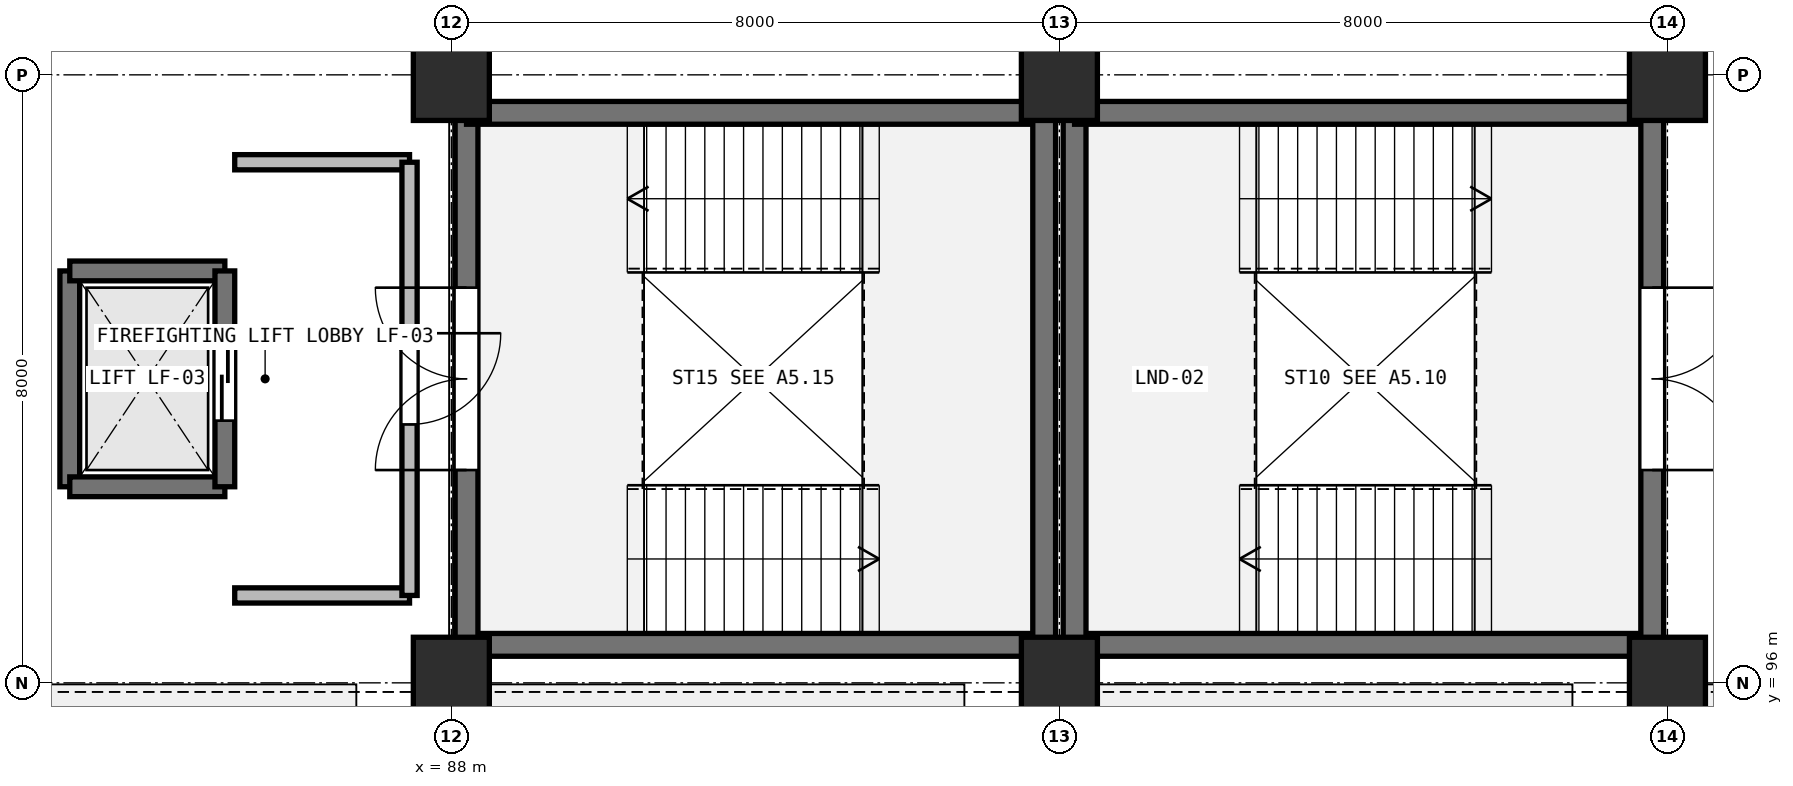
"""IFC4 building model, lengths in metres.
Left out: names, types, materials, properties, quantities, classifications, styles, units other than length and angle.
Written with IfcOpenShell. Run it as: python <this file> out.ifc"""

import sys

from ifc_helpers import new_model, si_unit, direction, frame, frame_2d, origin, origin_2d, place, context, subcontext, project, spatial, rectangle, extrude, element, fill, save


model = new_model("IFC4")
c1 = context("Model", 3, precision=1e-05, world=origin(), true_north=direction((0.0, 1.0)))
c2 = subcontext(c1, "Body", "Model", "MODEL_VIEW")
j1 = project(units=[si_unit("LENGTHUNIT", "METRE"), si_unit("PLANEANGLEUNIT", "RADIAN")], contexts=[c1])
p1 = place(None, origin())
s1 = spatial("IfcSite", under=j1, at=p1, CompositionType="ELEMENT")
p2 = place(p1, origin())
s2 = spatial("IfcBuilding", under=s1, at=p2, CompositionType="ELEMENT")
p3 = place(p2, frame((0.0, 0.0, 15.0)))
s3 = spatial("IfcBuildingStorey", under=s2, at=p3, CompositionType="ELEMENT", Elevation=15.0)
for number, where, z_axis, x_axis in (
    (1, (88.0, 96.0, 0.0), (0.0, 0.0, 1.0), (1.0, 0.0, 0.0)),
    (2, (88.0, 104.0, 0.0), (0.0, 0.0, 1.0), (1.0, 0.0, 0.0)),
    (3, (96.0, 96.0, 0.0), (0.0, 0.0, 1.0), (1.0, 0.0, 0.0)),
    (4, (96.0, 104.0, 0.0), (0.0, 0.0, 1.0), (1.0, 0.0, 0.0)),
    (5, (104.0, 96.0, 0.0), (0.0, 0.0, 1.0), (1.0, 0.0, 0.0)),
    (6, (104.0, 104.0, 0.0), (0.0, 0.0, 1.0), (1.0, 0.0, 0.0)),
):
    element("IfcColumn", number, at=place(p3, frame(where, z_axis=z_axis, x_axis=x_axis)), inside=s3, PredefinedType="COLUMN", context=c2, shape_type="SweptSolid", body=[
        extrude(rectangle(XDim=1.0, YDim=1.2, at=origin_2d()), origin(), (0.0, 0.0, 1.0), 4.8),
    ])
p4 = place(p3, frame((103.8, 96.5, 0.0), z_axis=(0.0, 0.0, 1.0), x_axis=(-1.0, 0.0, 0.0)))
e7 = element("IfcWall", 7, at=p4, inside=s3, PredefinedType="SHEAR", context=c2, shape_type="SweptSolid", body=[
    extrude(rectangle(XDim=7.6, YDim=0.3, at=frame_2d((3.8, 0.0))), origin(), (0.0, 0.0, 1.0), 4.5),
])
p5 = place(p3, frame((96.2, 96.5, 0.0), z_axis=(0.0, 0.0, 1.0), x_axis=(0.0, 1.0, 0.0)))
e8 = element("IfcWall", 8, at=p5, inside=s3, PredefinedType="SHEAR", context=c2, shape_type="SweptSolid", body=[
    extrude(rectangle(XDim=7.0, YDim=0.3, at=frame_2d((3.5, 0.0))), origin(), (0.0, 0.0, 1.0), 4.5),
])
p6 = place(p3, frame((96.2, 103.5, 0.0), z_axis=(0.0, 0.0, 1.0), x_axis=(1.0, 0.0, 0.0)))
e9 = element("IfcWall", 9, at=p6, inside=s3, PredefinedType="SHEAR", context=c2, shape_type="SweptSolid", body=[
    extrude(rectangle(XDim=7.6, YDim=0.3, at=frame_2d((3.8, 0.0))), origin(), (0.0, 0.0, 1.0), 4.5),
])
p7 = place(p3, frame((103.8, 103.5, 0.0), z_axis=(0.0, 0.0, 1.0), x_axis=(0.0, -1.0, 0.0)))
e10 = element("IfcWall", 10, at=p7, inside=s3, PredefinedType="SHEAR", context=c2, shape_type="SweptSolid", body=[
    extrude(rectangle(XDim=7.0, YDim=0.3, at=frame_2d((3.5, 0.0))), origin(), (0.0, 0.0, 1.0), 4.5),
])
p8 = place(p7, frame((2.3, 0.0, 0.0)))
e11 = element("IfcOpeningElement", 11, at=p8, cuts=e10, PredefinedType="OPENING", context=c2, shape_type="SweptSolid", body=[
    extrude(rectangle(XDim=2.4, YDim=2.2, at=frame_2d((1.2, 1.1))), frame((0.0, 0.16, 0.0), z_axis=(0.0, -1.0, 0.0), x_axis=(1.0, 0.0, 0.0)), (0.0, 0.0, 1.0), 0.32),
])
p9 = place(p3, frame((95.8, 96.5, 0.0), z_axis=(0.0, 0.0, 1.0), x_axis=(-1.0, 0.0, 0.0)))
e12 = element("IfcWall", 12, at=p9, inside=s3, PredefinedType="SHEAR", context=c2, shape_type="SweptSolid", body=[
    extrude(rectangle(XDim=7.6, YDim=0.3, at=frame_2d((3.8, 0.0))), origin(), (0.0, 0.0, 1.0), 4.5),
])
p10 = place(p3, frame((88.2, 96.5, 0.0), z_axis=(0.0, 0.0, 1.0), x_axis=(0.0, 1.0, 0.0)))
e13 = element("IfcWall", 13, at=p10, inside=s3, PredefinedType="SHEAR", context=c2, shape_type="SweptSolid", body=[
    extrude(rectangle(XDim=7.0, YDim=0.3, at=frame_2d((3.5, 0.0))), origin(), (0.0, 0.0, 1.0), 4.5),
])
p11 = place(p10, frame((2.3, 0.0, 0.0)))
e14 = element("IfcOpeningElement", 14, at=p11, cuts=e13, PredefinedType="OPENING", context=c2, shape_type="SweptSolid", body=[
    extrude(rectangle(XDim=2.4, YDim=2.2, at=frame_2d((1.2, 1.1))), frame((0.0, 0.16, 0.0), z_axis=(0.0, -1.0, 0.0), x_axis=(1.0, 0.0, 0.0)), (0.0, 0.0, 1.0), 0.32),
])
p12 = place(p3, frame((88.2, 103.5, 0.0), z_axis=(0.0, 0.0, 1.0), x_axis=(1.0, 0.0, 0.0)))
e15 = element("IfcWall", 15, at=p12, inside=s3, PredefinedType="SHEAR", context=c2, shape_type="SweptSolid", body=[
    extrude(rectangle(XDim=7.6, YDim=0.3, at=frame_2d((3.8, 0.0))), origin(), (0.0, 0.0, 1.0), 4.5),
])
p13 = place(p3, frame((95.8, 103.5, 0.0), z_axis=(0.0, 0.0, 1.0), x_axis=(0.0, -1.0, 0.0)))
e16 = element("IfcWall", 16, at=p13, inside=s3, PredefinedType="SHEAR", context=c2, shape_type="SweptSolid", body=[
    extrude(rectangle(XDim=7.0, YDim=0.3, at=frame_2d((3.5, 0.0))), origin(), (0.0, 0.0, 1.0), 4.5),
])
p14 = place(p3, frame((82.98, 98.58, 0.0), z_axis=(0.0, 0.0, 1.0), x_axis=(0.0, 1.0, 0.0)))
e17 = element("IfcWall", 17, at=p14, inside=s3, PredefinedType="SHEAR", context=c2, shape_type="SweptSolid", body=[
    extrude(rectangle(XDim=2.84, YDim=0.26, at=frame_2d((1.42, 0.0))), origin(), (0.0, 0.0, 1.0), 4.5),
])
for number, where, z_axis, x_axis in (
    (18, (82.98, 101.42, 0.0), (0.0, 0.0, 1.0), (1.0, 0.0, 0.0)),
    (19, (85.02, 98.58, 0.0), (0.0, 0.0, 1.0), (-1.0, 0.0, 0.0)),
):
    element("IfcWall", number, at=place(p3, frame(where, z_axis=z_axis, x_axis=x_axis)), inside=s3, PredefinedType="SHEAR", context=c2, shape_type="SweptSolid", body=[
        extrude(rectangle(XDim=2.04, YDim=0.26, at=frame_2d((1.02, 0.0))), origin(), (0.0, 0.0, 1.0), 4.5),
    ])
p15 = place(p3, frame((85.02, 101.42, 0.0), z_axis=(0.0, 0.0, 1.0), x_axis=(0.0, -1.0, 0.0)))
e20 = element("IfcWall", 20, at=p15, inside=s3, PredefinedType="SHEAR", context=c2, shape_type="SweptSolid", body=[
    extrude(rectangle(XDim=2.84, YDim=0.26, at=frame_2d((1.42, 0.0))), origin(), (0.0, 0.0, 1.0), 4.5),
])
p16 = place(p15, frame((0.87, 0.0, 0.0)))
e21 = element("IfcOpeningElement", 21, at=p16, cuts=e20, PredefinedType="OPENING", context=c2, shape_type="SweptSolid", body=[
    extrude(rectangle(XDim=1.1, YDim=2.15, at=frame_2d((0.55, 1.075))), frame((0.0, 0.14, 0.0), z_axis=(0.0, -1.0, 0.0), x_axis=(1.0, 0.0, 0.0)), (0.0, 0.0, 1.0), 0.28),
])
for number, where, z_axis, x_axis in (
    (22, (85.15, 102.85, 0.0), (0.0, 0.0, 1.0), (1.0, 0.0, 0.0)),
    (23, (87.45, 97.15, 0.0), (0.0, 0.0, 1.0), (-1.0, 0.0, 0.0)),
):
    element("IfcWall", number, at=place(p3, frame(where, z_axis=z_axis, x_axis=x_axis)), inside=s3, PredefinedType="PARTITIONING", context=c2, shape_type="SweptSolid", body=[
        extrude(rectangle(XDim=2.3, YDim=0.2, at=frame_2d((1.15, 0.0))), origin(), (0.0, 0.0, 1.0), 4.5),
    ])
p17 = place(p3, frame((87.45, 102.85, 0.0), z_axis=(0.0, 0.0, 1.0), x_axis=(0.0, -1.0, 0.0)))
e24 = element("IfcWall", 24, at=p17, inside=s3, PredefinedType="PARTITIONING", context=c2, shape_type="SweptSolid", body=[
    extrude(rectangle(XDim=5.7, YDim=0.2, at=frame_2d((2.85, 0.0))), origin(), (0.0, 0.0, 1.0), 3.6),
])
p18 = place(p17, frame((2.25, 0.0, 0.0)))
e25 = element("IfcOpeningElement", 25, at=p18, cuts=e24, PredefinedType="OPENING", context=c2, shape_type="SweptSolid", body=[
    extrude(rectangle(XDim=1.2, YDim=2.2, at=frame_2d((0.6, 1.1))), frame((0.0, 0.11, 0.0), z_axis=(0.0, -1.0, 0.0), x_axis=(1.0, 0.0, 0.0)), (0.0, 0.0, 1.0), 0.22),
])
p19 = place(p8, frame((2.4, 0.0, 0.0), z_axis=(0.0, 0.0, 1.0), x_axis=(-1.0, 0.0, 0.0)))
e26 = element("IfcDoor", 26, at=p19, inside=s3, OperationType="DOUBLE_DOOR_SINGLE_SWING", PredefinedType="DOOR", context=c2, shape_type="SweptSolid", body=[
    extrude(rectangle(XDim=2.4, YDim=2.2, at=frame_2d((1.2, 1.1))), frame((0.0, 0.025, 0.0), z_axis=(0.0, -1.0, 0.0), x_axis=(1.0, 0.0, 0.0)), (0.0, 0.0, 1.0), 0.05),
])
fill(e11, e26)
p20 = place(p11, frame((2.4, 0.0, 0.0), z_axis=(0.0, 0.0, 1.0), x_axis=(-1.0, 0.0, 0.0)))
e27 = element("IfcDoor", 27, at=p20, inside=s3, OperationType="DOUBLE_DOOR_SINGLE_SWING", PredefinedType="DOOR", context=c2, shape_type="SweptSolid", body=[
    extrude(rectangle(XDim=2.4, YDim=2.2, at=frame_2d((1.2, 1.1))), frame((0.0, 0.025, 0.0), z_axis=(0.0, -1.0, 0.0), x_axis=(1.0, 0.0, 0.0)), (0.0, 0.0, 1.0), 0.05),
])
fill(e14, e27)
p21 = place(p16, origin())
e28 = element("IfcDoor", 28, at=p21, inside=s3, OperationType="SLIDING_TO_LEFT", PredefinedType="DOOR", context=c2, shape_type="SweptSolid", body=[
    extrude(rectangle(XDim=1.1, YDim=2.15, at=frame_2d((0.55, 1.075))), frame((0.0, 0.025, 0.0), z_axis=(0.0, -1.0, 0.0), x_axis=(1.0, 0.0, 0.0)), (0.0, 0.0, 1.0), 0.05),
])
fill(e21, e28)
p22 = place(p18, origin())
e29 = element("IfcDoor", 29, at=p22, inside=s3, OperationType="SINGLE_SWING_LEFT", PredefinedType="DOOR", context=c2, shape_type="SweptSolid", body=[
    extrude(rectangle(XDim=1.2, YDim=2.2, at=frame_2d((0.6, 1.1))), frame((0.0, 0.025, 0.0), z_axis=(0.0, -1.0, 0.0), x_axis=(1.0, 0.0, 0.0)), (0.0, 0.0, 1.0), 0.05),
])
fill(e25, e29)
save(model, sys.argv[1])
